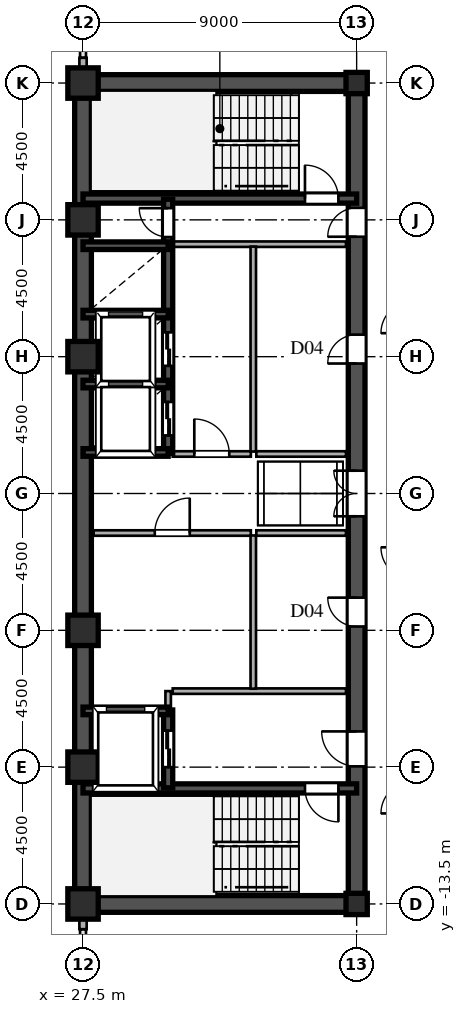
"""IFC4 building model, lengths in metres.
Left out: names, types, materials, properties, quantities, classifications, styles, units other than length and angle.
Written with IfcOpenShell. Run it as: python <this file> out.ifc"""

import sys

from ifc_helpers import new_model, si_unit, direction, frame, frame_2d, origin, origin_2d, place, context, subcontext, project, spatial, rectangle, hollow_rectangle, i_section, extrude, source, transform, mapped, element, fill, save


model = new_model("IFC4")
c1 = context("Model", 3, precision=1e-05, world=origin(), true_north=direction((0.0, 1.0)))
c2 = subcontext(c1, "Body", "Model", "MODEL_VIEW")
j1 = project(units=[si_unit("LENGTHUNIT", "METRE"), si_unit("PLANEANGLEUNIT", "RADIAN")], contexts=[c1])
p1 = place(None, origin())
s1 = spatial("IfcSite", under=j1, at=p1, CompositionType="ELEMENT")
p2 = place(p1, origin())
s2 = spatial("IfcBuilding", under=s1, at=p2, CompositionType="ELEMENT")
p3 = place(p2, frame((0.0, 0.0, 154.8)))
s3 = spatial("IfcBuildingStorey", under=s2, at=p3, CompositionType="ELEMENT", Elevation=154.8)
m1 = source(origin(), c2, "Body", "SweptSolid", [
    extrude(hollow_rectangle(XDim=1.0, YDim=1.0, WallThickness=0.042, at=origin_2d()), origin(), (0.0, 0.0, 1.0), 3.6),
])
for number, where, z_axis, x_axis in (
    (1, (27.5, -13.5, 0.0), (0.0, 0.0, 1.0), (1.0, 0.0, 0.0)),
    (2, (27.5, -9.0, 0.0), (0.0, 0.0, 1.0), (1.0, 0.0, 0.0)),
    (3, (27.5, -4.5, 0.0), (0.0, 0.0, 1.0), (1.0, 0.0, 0.0)),
    (4, (27.5, 4.5, 0.0), (0.0, 0.0, 1.0), (1.0, 0.0, 0.0)),
    (5, (27.5, 9.0, 0.0), (0.0, 0.0, 1.0), (1.0, 0.0, 0.0)),
    (6, (27.5, 13.5, 0.0), (0.0, 0.0, 1.0), (1.0, 0.0, 0.0)),
):
    element("IfcColumn", number, at=place(p3, frame(where, z_axis=z_axis, x_axis=x_axis)), inside=s3, PredefinedType="COLUMN", context=c2, shape_type="MappedRepresentation", body=[
        mapped(m1, transform((0.0, 0.0, 0.0), scale=1.0)),
    ])
m2 = source(origin(), c2, "Body", "SweptSolid", [
    extrude(i_section(OverallWidth=0.7, OverallDepth=0.7, WebThickness=0.028, FlangeThickness=0.045, at=origin_2d()), origin(), (0.0, 0.0, 1.0), 3.6),
])
for number, where, z_axis, x_axis in (
    (7, (36.5, -13.5, 0.0), (0.0, 0.0, 1.0), (1.0, 0.0, 0.0)),
    (8, (36.5, 13.5, 0.0), (0.0, 0.0, 1.0), (1.0, 0.0, 0.0)),
):
    element("IfcColumn", number, at=place(p3, frame(where, z_axis=z_axis, x_axis=x_axis)), inside=s3, PredefinedType="COLUMN", context=c2, shape_type="MappedRepresentation", body=[
        mapped(m2, transform((0.0, 0.0, 0.0), scale=1.0)),
    ])
for number, where, z_axis, x_axis in (
    (9, (27.5, -14.33, 0.0), (0.0, 0.0, 1.0), (0.0, 1.0, 0.0)),
    (10, (27.5, 13.78, 0.0), (0.0, 0.0, 1.0), (0.0, 1.0, 0.0)),
):
    element("IfcWall", number, at=place(p3, frame(where, z_axis=z_axis, x_axis=x_axis)), inside=s3, PredefinedType="SOLIDWALL", context=c2, shape_type="SweptSolid", body=[
        extrude(rectangle(XDim=0.55, YDim=0.24, at=frame_2d((0.275, 0.0))), origin(), (0.0, 0.0, 1.0), 1.88),
    ])
for number, where, z_axis, x_axis in (
    (11, (27.5, -13.5, 0.0), (0.0, 0.0, 1.0), (0.0, 1.0, 0.0)),
    (12, (27.5, 1.3, 0.0), (0.0, 0.0, 1.0), (0.0, 1.0, 0.0)),
):
    element("IfcWall", number, at=place(p3, frame(where, z_axis=z_axis, x_axis=x_axis)), inside=s3, PredefinedType="SHEAR", context=c2, shape_type="SweptSolid", body=[
        extrude(rectangle(XDim=12.2, YDim=0.55, at=frame_2d((6.1, 0.0))), origin(), (0.0, 0.0, 1.0), 3.38),
    ])
p4 = place(p3, frame((27.5, -1.3, 0.0), z_axis=(0.0, 0.0, 1.0), x_axis=(0.0, 1.0, 0.0)))
e13 = element("IfcWall", 13, at=p4, inside=s3, PredefinedType="SHEAR", context=c2, shape_type="SweptSolid", body=[
    extrude(rectangle(XDim=2.6, YDim=0.55, at=frame_2d((1.3, 0.0))), origin(), (0.0, 0.0, 1.0), 3.38),
])
for number, where, z_axis, x_axis in (
    (14, (27.5, -13.5, 0.0), (0.0, 0.0, 1.0), (1.0, 0.0, 0.0)),
    (15, (27.5, 13.5, 0.0), (0.0, 0.0, 1.0), (1.0, 0.0, 0.0)),
):
    element("IfcWall", number, at=place(p3, frame(where, z_axis=z_axis, x_axis=x_axis)), inside=s3, PredefinedType="SHEAR", context=c2, shape_type="SweptSolid", body=[
        extrude(rectangle(XDim=9.0, YDim=0.55, at=frame_2d((4.5, 0.0))), origin(), (0.0, 0.0, 1.0), 3.38),
    ])
p5 = place(p3, frame((36.5, -13.65, 0.0), z_axis=(0.0, 0.0, 1.0), x_axis=(0.0, 1.0, 0.0)))
e16 = element("IfcWall", 16, at=p5, inside=s3, PredefinedType="SHEAR", context=c2, shape_type="SweptSolid", body=[
    extrude(rectangle(XDim=7.15, YDim=0.55, at=frame_2d((3.575, 0.0))), origin(), (0.0, 0.0, 1.0), 3.38),
])
p6 = place(p5, frame((4.675, 0.0, 0.0)))
e17 = element("IfcOpeningElement", 17, at=p6, cuts=e16, PredefinedType="OPENING", context=c2, shape_type="SweptSolid", body=[
    extrude(rectangle(XDim=1.15, YDim=2.2, at=frame_2d((0.575, 1.1))), frame((0.0, 0.285, 0.0), z_axis=(0.0, -1.0, 0.0), x_axis=(1.0, 0.0, 0.0)), (0.0, 0.0, 1.0), 0.57),
])
p7 = place(p3, frame((36.5, -1.3, 0.0), z_axis=(0.0, 0.0, 1.0), x_axis=(0.0, 1.0, 0.0)))
e18 = element("IfcWall", 18, at=p7, inside=s3, PredefinedType="SHEAR", context=c2, shape_type="SweptSolid", body=[
    extrude(rectangle(XDim=2.6, YDim=0.55, at=frame_2d((1.3, 0.0))), origin(), (0.0, 0.0, 1.0), 3.38),
])
p8 = place(p7, frame((0.55, 0.0, 0.0)))
e19 = element("IfcOpeningElement", 19, at=p8, cuts=e18, PredefinedType="OPENING", context=c2, shape_type="SweptSolid", body=[
    extrude(rectangle(XDim=1.5, YDim=2.3, at=frame_2d((0.75, 1.15))), frame((0.0, 0.285, 0.0), z_axis=(0.0, -1.0, 0.0), x_axis=(1.0, 0.0, 0.0)), (0.0, 0.0, 1.0), 0.57),
])
p9 = place(p3, frame((36.5, 8.2, 0.0), z_axis=(0.0, 0.0, 1.0), x_axis=(0.0, 1.0, 0.0)))
e20 = element("IfcWall", 20, at=p9, inside=s3, PredefinedType="SHEAR", context=c2, shape_type="SweptSolid", body=[
    extrude(rectangle(XDim=5.45, YDim=0.55, at=frame_2d((2.725, 0.0))), origin(), (0.0, 0.0, 1.0), 3.38),
])
p10 = place(p9, frame((0.245, 0.0, 0.0)))
e21 = element("IfcOpeningElement", 21, at=p10, cuts=e20, PredefinedType="OPENING", context=c2, shape_type="SweptSolid", body=[
    extrude(rectangle(XDim=0.95, YDim=2.15, at=frame_2d((0.475, 1.075))), frame((0.0, 0.285, 0.0), z_axis=(0.0, -1.0, 0.0), x_axis=(1.0, 0.0, 0.0)), (0.0, 0.0, 1.0), 0.57),
])
p11 = place(p3, frame((36.5, -6.5, 0.0), z_axis=(0.0, 0.0, 1.0), x_axis=(0.0, 1.0, 0.0)))
e22 = element("IfcWall", 22, at=p11, inside=s3, PredefinedType="SHEAR", context=c2, shape_type="SweptSolid", body=[
    extrude(rectangle(XDim=5.2, YDim=0.55, at=frame_2d((2.6, 0.0))), origin(), (0.0, 0.0, 1.0), 3.38),
])
p12 = place(p11, frame((2.125, 0.0, 0.0)))
e23 = element("IfcOpeningElement", 23, at=p12, cuts=e22, PredefinedType="OPENING", context=c2, shape_type="SweptSolid", body=[
    extrude(rectangle(XDim=0.95, YDim=2.15, at=frame_2d((0.475, 1.075))), frame((0.0, 0.285, 0.0), z_axis=(0.0, -1.0, 0.0), x_axis=(1.0, 0.0, 0.0)), (0.0, 0.0, 1.0), 0.57),
])
p13 = place(p3, frame((36.5, 1.3, 0.0), z_axis=(0.0, 0.0, 1.0), x_axis=(0.0, 1.0, 0.0)))
e24 = element("IfcWall", 24, at=p13, inside=s3, PredefinedType="SHEAR", context=c2, shape_type="SweptSolid", body=[
    extrude(rectangle(XDim=6.9, YDim=0.55, at=frame_2d((3.45, 0.0))), origin(), (0.0, 0.0, 1.0), 3.38),
])
p14 = place(p13, frame((2.975, 0.0, 0.0)))
e25 = element("IfcOpeningElement", 25, at=p14, cuts=e24, PredefinedType="OPENING", context=c2, shape_type="SweptSolid", body=[
    extrude(rectangle(XDim=0.95, YDim=2.15, at=frame_2d((0.475, 1.075))), frame((0.0, 0.285, 0.0), z_axis=(0.0, -1.0, 0.0), x_axis=(1.0, 0.0, 0.0)), (0.0, 0.0, 1.0), 0.57),
])
p15 = place(p3, frame((27.5, -9.7, 0.0), z_axis=(0.0, 0.0, 1.0), x_axis=(1.0, 0.0, 0.0)))
e26 = element("IfcWall", 26, at=p15, inside=s3, PredefinedType="SHEAR", context=c2, shape_type="SweptSolid", body=[
    extrude(rectangle(XDim=9.0, YDim=0.3, at=frame_2d((4.5, 0.0))), origin(), (0.0, 0.0, 1.0), 3.38),
])
p16 = place(p15, frame((7.3, 0.0, 0.0)))
e27 = element("IfcOpeningElement", 27, at=p16, cuts=e26, PredefinedType="OPENING", context=c2, shape_type="SweptSolid", body=[
    extrude(rectangle(XDim=1.1, YDim=2.2, at=frame_2d((0.55, 1.1))), frame((0.0, 0.16, 0.0), z_axis=(0.0, -1.0, 0.0), x_axis=(1.0, 0.0, 0.0)), (0.0, 0.0, 1.0), 0.32),
])
p17 = place(p3, frame((27.5, 9.7, 0.0), z_axis=(0.0, 0.0, 1.0), x_axis=(1.0, 0.0, 0.0)))
e28 = element("IfcWall", 28, at=p17, inside=s3, PredefinedType="SHEAR", context=c2, shape_type="SweptSolid", body=[
    extrude(rectangle(XDim=9.0, YDim=0.3, at=frame_2d((4.5, 0.0))), origin(), (0.0, 0.0, 1.0), 3.38),
])
p18 = place(p17, frame((7.3, 0.0, 0.0)))
e29 = element("IfcOpeningElement", 29, at=p18, cuts=e28, PredefinedType="OPENING", context=c2, shape_type="SweptSolid", body=[
    extrude(rectangle(XDim=1.1, YDim=2.2, at=frame_2d((0.55, 1.1))), frame((0.0, 0.16, 0.0), z_axis=(0.0, -1.0, 0.0), x_axis=(1.0, 0.0, 0.0)), (0.0, 0.0, 1.0), 0.32),
])
for number, where, z_axis, x_axis in (
    (30, (27.5, -7.15, 0.0), (0.0, 0.0, 1.0), (1.0, 0.0, 0.0)),
    (31, (27.5, 1.35, 0.0), (0.0, 0.0, 1.0), (1.0, 0.0, 0.0)),
    (32, (27.5, 3.6, 0.0), (0.0, 0.0, 1.0), (1.0, 0.0, 0.0)),
    (33, (27.5, 5.9, 0.0), (0.0, 0.0, 1.0), (1.0, 0.0, 0.0)),
    (34, (27.5, 8.15, 0.0), (0.0, 0.0, 1.0), (1.0, 0.0, 0.0)),
):
    element("IfcWall", number, at=place(p3, frame(where, z_axis=z_axis, x_axis=x_axis)), inside=s3, PredefinedType="SHEAR", context=c2, shape_type="SweptSolid", body=[
        extrude(rectangle(XDim=2.8, YDim=0.25, at=frame_2d((1.4, 0.0))), origin(), (0.0, 0.0, 1.0), 3.38),
    ])
p19 = place(p3, frame((30.3, -9.68, 0.0), z_axis=(0.0, 0.0, 1.0), x_axis=(0.0, 1.0, 0.0)))
e35 = element("IfcWall", 35, at=p19, inside=s3, PredefinedType="SHEAR", context=c2, shape_type="SweptSolid", body=[
    extrude(rectangle(XDim=2.56, YDim=0.3, at=frame_2d((1.28, 0.0))), origin(), (0.0, 0.0, 1.0), 3.38),
])
p20 = place(p19, frame((0.68, 0.0, 0.0)))
e36 = element("IfcOpeningElement", 36, at=p20, cuts=e35, PredefinedType="OPENING", context=c2, shape_type="SweptSolid", body=[
    extrude(rectangle(XDim=1.2, YDim=2.25, at=frame_2d((0.6, 1.125))), frame((0.0, 0.16, 0.0), z_axis=(0.0, -1.0, 0.0), x_axis=(1.0, 0.0, 0.0)), (0.0, 0.0, 1.0), 0.32),
])
p21 = place(p3, frame((30.3, 1.32, 0.0), z_axis=(0.0, 0.0, 1.0), x_axis=(0.0, 1.0, 0.0)))
e37 = element("IfcWall", 37, at=p21, inside=s3, PredefinedType="SHEAR", context=c2, shape_type="SweptSolid", body=[
    extrude(rectangle(XDim=2.28, YDim=0.3, at=frame_2d((1.14, 0.0))), origin(), (0.0, 0.0, 1.0), 3.38),
])
p22 = place(p21, frame((0.59, 0.0, 0.0)))
e38 = element("IfcOpeningElement", 38, at=p22, cuts=e37, PredefinedType="OPENING", context=c2, shape_type="SweptSolid", body=[
    extrude(rectangle(XDim=1.1, YDim=2.2, at=frame_2d((0.55, 1.1))), frame((0.0, 0.16, 0.0), z_axis=(0.0, -1.0, 0.0), x_axis=(1.0, 0.0, 0.0)), (0.0, 0.0, 1.0), 0.32),
])
p23 = place(p3, frame((30.3, 3.6, 0.0), z_axis=(0.0, 0.0, 1.0), x_axis=(0.0, 1.0, 0.0)))
e39 = element("IfcWall", 39, at=p23, inside=s3, PredefinedType="SHEAR", context=c2, shape_type="SweptSolid", body=[
    extrude(rectangle(XDim=2.3, YDim=0.3, at=frame_2d((1.15, 0.0))), origin(), (0.0, 0.0, 1.0), 3.38),
])
p24 = place(p23, frame((0.6, 0.0, 0.0)))
e40 = element("IfcOpeningElement", 40, at=p24, cuts=e39, PredefinedType="OPENING", context=c2, shape_type="SweptSolid", body=[
    extrude(rectangle(XDim=1.1, YDim=2.2, at=frame_2d((0.55, 1.1))), frame((0.0, 0.16, 0.0), z_axis=(0.0, -1.0, 0.0), x_axis=(1.0, 0.0, 0.0)), (0.0, 0.0, 1.0), 0.32),
])
p25 = place(p3, frame((30.3, 5.9, 0.0), z_axis=(0.0, 0.0, 1.0), x_axis=(0.0, 1.0, 0.0)))
e41 = element("IfcWall", 41, at=p25, inside=s3, PredefinedType="SHEAR", context=c2, shape_type="SweptSolid", body=[
    extrude(rectangle(XDim=2.25, YDim=0.3, at=frame_2d((1.125, 0.0))), origin(), (0.0, 0.0, 1.0), 3.38),
])
p26 = place(p3, frame((30.3, 8.15, 0.0), z_axis=(0.0, 0.0, 1.0), x_axis=(0.0, 1.0, 0.0)))
e42 = element("IfcWall", 42, at=p26, inside=s3, PredefinedType="SHEAR", context=c2, shape_type="SweptSolid", body=[
    extrude(rectangle(XDim=1.53, YDim=0.3, at=frame_2d((0.765, 0.0))), origin(), (0.0, 0.0, 1.0), 3.38),
])
p27 = place(p26, frame((0.285, 0.0, 0.0)))
e43 = element("IfcOpeningElement", 43, at=p27, cuts=e42, PredefinedType="OPENING", context=c2, shape_type="SweptSolid", body=[
    extrude(rectangle(XDim=0.95, YDim=2.15, at=frame_2d((0.475, 1.075))), frame((0.0, 0.16, 0.0), z_axis=(0.0, -1.0, 0.0), x_axis=(1.0, 0.0, 0.0)), (0.0, 0.0, 1.0), 0.32),
])
p28 = place(p3, frame((30.45, -6.5, 0.0), z_axis=(0.0, 0.0, 1.0), x_axis=(1.0, 0.0, 0.0)))
e44 = element("IfcWall", 44, at=p28, inside=s3, PredefinedType="PARTITIONING", context=c2, shape_type="SweptSolid", body=[
    extrude(rectangle(XDim=5.7, YDim=0.18, at=frame_2d((2.85, 0.0))), origin(), (0.0, 0.0, 1.0), 3.38),
])
p29 = place(p3, frame((30.3, -7.12, 0.0), z_axis=(0.0, 0.0, 1.0), x_axis=(0.0, 1.0, 0.0)))
e45 = element("IfcWall", 45, at=p29, inside=s3, PredefinedType="PARTITIONING", context=c2, shape_type="SweptSolid", body=[
    extrude(rectangle(XDim=0.62, YDim=0.18, at=frame_2d((0.31, 0.0))), origin(), (0.0, 0.0, 1.0), 3.38),
])
p30 = place(p3, frame((30.45, 8.2, 0.0), z_axis=(0.0, 0.0, 1.0), x_axis=(1.0, 0.0, 0.0)))
e46 = element("IfcWall", 46, at=p30, inside=s3, PredefinedType="PARTITIONING", context=c2, shape_type="SweptSolid", body=[
    extrude(rectangle(XDim=5.7, YDim=0.18, at=frame_2d((2.85, 0.0))), origin(), (0.0, 0.0, 1.0), 3.38),
])
p31 = place(p3, frame((33.1, -6.42, 0.0), z_axis=(0.0, 0.0, 1.0), x_axis=(0.0, 1.0, 0.0)))
e47 = element("IfcWall", 47, at=p31, inside=s3, PredefinedType="PARTITIONING", context=c2, shape_type="SweptSolid", body=[
    extrude(rectangle(XDim=5.04, YDim=0.18, at=frame_2d((2.52, 0.0))), origin(), (0.0, 0.0, 1.0), 3.38),
])
p32 = place(p3, frame((33.1, 1.38, 0.0), z_axis=(0.0, 0.0, 1.0), x_axis=(0.0, 1.0, 0.0)))
e48 = element("IfcWall", 48, at=p32, inside=s3, PredefinedType="PARTITIONING", context=c2, shape_type="SweptSolid", body=[
    extrude(rectangle(XDim=6.74, YDim=0.18, at=frame_2d((3.37, 0.0))), origin(), (0.0, 0.0, 1.0), 3.38),
])
p33 = place(p3, frame((27.85, -1.3, 0.0), z_axis=(0.0, 0.0, 1.0), x_axis=(1.0, 0.0, 0.0)))
e49 = element("IfcWall", 49, at=p33, inside=s3, PredefinedType="PARTITIONING", context=c2, shape_type="SweptSolid", body=[
    extrude(rectangle(XDim=5.17, YDim=0.18, at=frame_2d((2.585, 0.0))), origin(), (0.0, 0.0, 1.0), 3.38),
])
p34 = place(p33, frame((2.01, 0.0, 0.0)))
e50 = element("IfcOpeningElement", 50, at=p34, cuts=e49, PredefinedType="OPENING", context=c2, shape_type="SweptSolid", body=[
    extrude(rectangle(XDim=1.15, YDim=2.2, at=frame_2d((0.575, 1.1))), frame((0.0, 0.1, 0.0), z_axis=(0.0, -1.0, 0.0), x_axis=(1.0, 0.0, 0.0)), (0.0, 0.0, 1.0), 0.2),
])
p35 = place(p3, frame((30.45, 1.3, 0.0), z_axis=(0.0, 0.0, 1.0), x_axis=(1.0, 0.0, 0.0)))
e51 = element("IfcWall", 51, at=p35, inside=s3, PredefinedType="PARTITIONING", context=c2, shape_type="SweptSolid", body=[
    extrude(rectangle(XDim=2.57, YDim=0.18, at=frame_2d((1.285, 0.0))), origin(), (0.0, 0.0, 1.0), 3.38),
])
p36 = place(p35, frame((0.71, 0.0, 0.0)))
e52 = element("IfcOpeningElement", 52, at=p36, cuts=e51, PredefinedType="OPENING", context=c2, shape_type="SweptSolid", body=[
    extrude(rectangle(XDim=1.15, YDim=2.2, at=frame_2d((0.575, 1.1))), frame((0.0, 0.1, 0.0), z_axis=(0.0, -1.0, 0.0), x_axis=(1.0, 0.0, 0.0)), (0.0, 0.0, 1.0), 0.2),
])
for number, where, z_axis, x_axis in (
    (53, (33.2, -1.3, 0.0), (0.0, 0.0, 1.0), (1.0, 0.0, 0.0)),
    (54, (33.2, 1.3, 0.0), (0.0, 0.0, 1.0), (1.0, 0.0, 0.0)),
):
    element("IfcWall", number, at=place(p3, frame(where, z_axis=z_axis, x_axis=x_axis)), inside=s3, PredefinedType="PARTITIONING", context=c2, shape_type="SweptSolid", body=[
        extrude(rectangle(XDim=2.95, YDim=0.18, at=frame_2d((1.475, 0.0))), origin(), (0.0, 0.0, 1.0), 3.38),
    ])
m3 = source(origin(), c2, "Body", "SweptSolid", [
    extrude(rectangle(XDim=1.15, YDim=2.2, at=frame_2d((0.575, 1.1))), frame((0.0, 0.025, 0.0), z_axis=(0.0, -1.0, 0.0), x_axis=(1.0, 0.0, 0.0)), (0.0, 0.0, 1.0), 0.05),
])
p37 = place(p6, origin())
e55 = element("IfcDoor", 55, at=p37, inside=s3, OperationType="SINGLE_SWING_RIGHT", PredefinedType="DOOR", context=c2, shape_type="MappedRepresentation", body=[
    mapped(m3, transform((0.0, 0.0, 0.0), scale=1.0)),
])
fill(e17, e55)
m4 = source(origin(), c2, "Body", "SweptSolid", [
    extrude(rectangle(XDim=1.5, YDim=2.3, at=frame_2d((0.75, 1.15))), frame((0.0, 0.025, 0.0), z_axis=(0.0, -1.0, 0.0), x_axis=(1.0, 0.0, 0.0)), (0.0, 0.0, 1.0), 0.05),
])
p38 = place(p8, origin())
e56 = element("IfcDoor", 56, at=p38, inside=s3, OperationType="DOUBLE_SWING_LEFT", PredefinedType="DOOR", context=c2, shape_type="MappedRepresentation", body=[
    mapped(m4, transform((0.0, 0.0, 0.0), scale=1.0)),
])
fill(e19, e56)
m5 = source(origin(), c2, "Body", "SweptSolid", [
    extrude(rectangle(XDim=0.95, YDim=2.15, at=frame_2d((0.475, 1.075))), frame((0.0, 0.025, 0.0), z_axis=(0.0, -1.0, 0.0), x_axis=(1.0, 0.0, 0.0)), (0.0, 0.0, 1.0), 0.05),
])
p39 = place(p10, origin())
e57 = element("IfcDoor", 57, at=p39, inside=s3, OperationType="SINGLE_SWING_LEFT", PredefinedType="DOOR", context=c2, shape_type="MappedRepresentation", body=[
    mapped(m5, transform((0.0, 0.0, 0.0), scale=1.0)),
])
fill(e21, e57)
p40 = place(p12, origin())
e58 = element("IfcDoor", 58, at=p40, inside=s3, OperationType="SINGLE_SWING_RIGHT", PredefinedType="DOOR", context=c2, shape_type="MappedRepresentation", body=[
    mapped(m5, transform((0.0, 0.0, 0.0), scale=1.0)),
])
fill(e23, e58)
p41 = place(p14, origin())
e59 = element("IfcDoor", 59, at=p41, inside=s3, OperationType="SINGLE_SWING_LEFT", PredefinedType="DOOR", context=c2, shape_type="MappedRepresentation", body=[
    mapped(m5, transform((0.0, 0.0, 0.0), scale=1.0)),
])
fill(e25, e59)
m6 = source(origin(), c2, "Body", "SweptSolid", [
    extrude(rectangle(XDim=1.1, YDim=2.2, at=frame_2d((0.55, 1.1))), frame((0.0, 0.025, 0.0), z_axis=(0.0, -1.0, 0.0), x_axis=(1.0, 0.0, 0.0)), (0.0, 0.0, 1.0), 0.05),
])
p42 = place(p16, frame((1.1, 0.0, 0.0), z_axis=(0.0, 0.0, 1.0), x_axis=(-1.0, 0.0, 0.0)))
e60 = element("IfcDoor", 60, at=p42, inside=s3, OperationType="SINGLE_SWING_RIGHT", PredefinedType="DOOR", context=c2, shape_type="MappedRepresentation", body=[
    mapped(m6, transform((0.0, 0.0, 0.0), scale=1.0)),
])
fill(e27, e60)
p43 = place(p18, origin())
e61 = element("IfcDoor", 61, at=p43, inside=s3, OperationType="SINGLE_SWING_LEFT", PredefinedType="DOOR", context=c2, shape_type="MappedRepresentation", body=[
    mapped(m6, transform((0.0, 0.0, 0.0), scale=1.0)),
])
fill(e29, e61)
m7 = source(origin(), c2, "Body", "SweptSolid", [
    extrude(rectangle(XDim=1.2, YDim=2.25, at=frame_2d((0.6, 1.125))), frame((0.0, 0.025, 0.0), z_axis=(0.0, -1.0, 0.0), x_axis=(1.0, 0.0, 0.0)), (0.0, 0.0, 1.0), 0.05),
])
p44 = place(p20, origin())
e62 = element("IfcDoor", 62, at=p44, inside=s3, OperationType="DOUBLE_DOOR_SLIDING", PredefinedType="DOOR", context=c2, shape_type="MappedRepresentation", body=[
    mapped(m7, transform((0.0, 0.0, 0.0), scale=1.0)),
])
fill(e36, e62)
m8 = source(origin(), c2, "Body", "SweptSolid", [
    extrude(rectangle(XDim=1.1, YDim=2.2, at=frame_2d((0.55, 1.1))), frame((0.0, 0.025, 0.0), z_axis=(0.0, -1.0, 0.0), x_axis=(1.0, 0.0, 0.0)), (0.0, 0.0, 1.0), 0.05),
])
p45 = place(p22, origin())
e63 = element("IfcDoor", 63, at=p45, inside=s3, OperationType="DOUBLE_DOOR_SLIDING", PredefinedType="DOOR", context=c2, shape_type="MappedRepresentation", body=[
    mapped(m8, transform((0.0, 0.0, 0.0), scale=1.0)),
])
fill(e38, e63)
p46 = place(p24, origin())
e64 = element("IfcDoor", 64, at=p46, inside=s3, OperationType="DOUBLE_DOOR_SLIDING", PredefinedType="DOOR", context=c2, shape_type="MappedRepresentation", body=[
    mapped(m8, transform((0.0, 0.0, 0.0), scale=1.0)),
])
fill(e40, e64)
p47 = place(p27, origin())
e65 = element("IfcDoor", 65, at=p47, inside=s3, OperationType="SINGLE_SWING_RIGHT", PredefinedType="DOOR", context=c2, shape_type="MappedRepresentation", body=[
    mapped(m5, transform((0.0, 0.0, 0.0), scale=1.0)),
])
fill(e43, e65)
p48 = place(p34, origin())
e66 = element("IfcDoor", 66, at=p48, inside=s3, OperationType="SINGLE_SWING_RIGHT", PredefinedType="DOOR", context=c2, shape_type="MappedRepresentation", body=[
    mapped(m3, transform((0.0, 0.0, 0.0), scale=1.0)),
])
fill(e50, e66)
p49 = place(p36, origin())
e67 = element("IfcDoor", 67, at=p49, inside=s3, OperationType="SINGLE_SWING_LEFT", PredefinedType="DOOR", context=c2, shape_type="MappedRepresentation", body=[
    mapped(m3, transform((0.0, 0.0, 0.0), scale=1.0)),
])
fill(e52, e67)
save(model, sys.argv[1])
